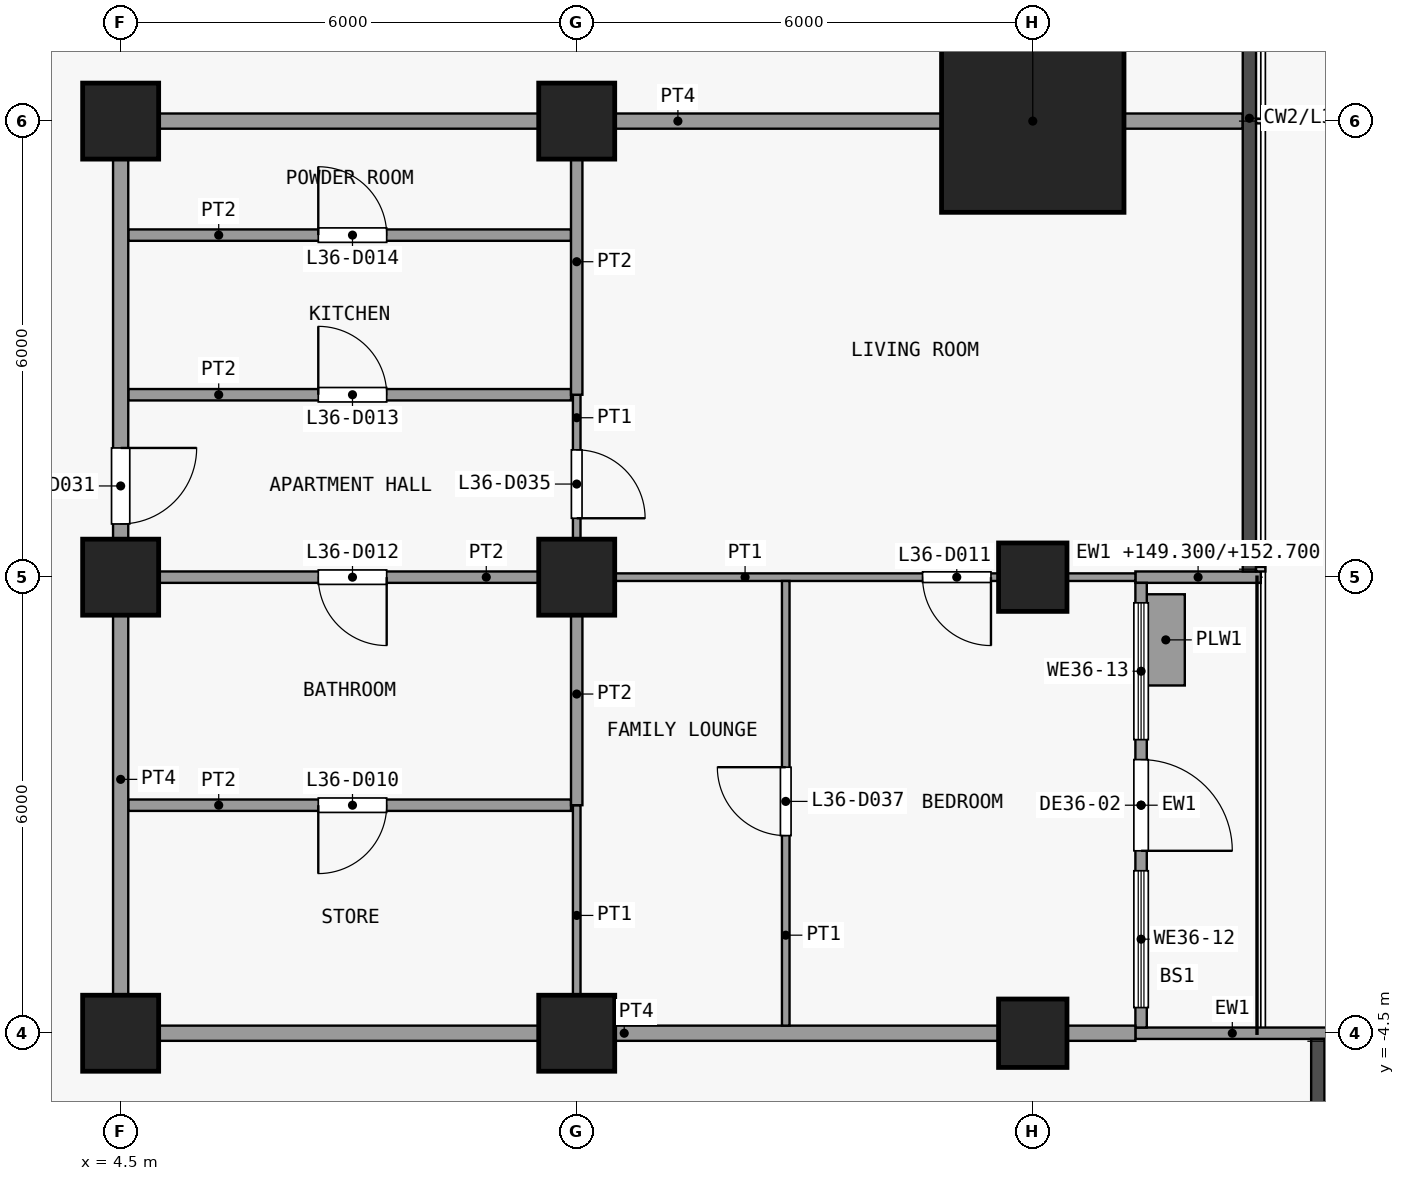
"""IFC4 building model, lengths in metres.
Left out: names, types, materials, properties, quantities, classifications, styles, units other than length and angle.
Written with IfcOpenShell. Run it as: python <this file> out.ifc"""

import sys

from ifc_helpers import new_model, si_unit, direction, frame, frame_2d, origin, origin_2d, place, context, subcontext, project, spatial, rectangle, extrude, element, fill, save


model = new_model("IFC4")
c1 = context("Model", 3, precision=1e-05, world=origin(), true_north=direction((0.0, 1.0)))
c2 = subcontext(c1, "Body", "Model", "MODEL_VIEW")
j1 = project(units=[si_unit("LENGTHUNIT", "METRE"), si_unit("PLANEANGLEUNIT", "RADIAN")], contexts=[c1])
p1 = place(None, origin())
s1 = spatial("IfcSite", under=j1, at=p1, CompositionType="ELEMENT")
p2 = place(p1, origin())
s2 = spatial("IfcBuilding", under=s1, at=p2, CompositionType="ELEMENT")
p3 = place(p2, frame((0.0, 0.0, 149.3)))
s3 = spatial("IfcBuildingStorey", under=s2, at=p3, CompositionType="ELEMENT", Elevation=149.3)
for number, where, z_axis, x_axis in (
    (1, (4.5, -4.5, 0.0), (0.0, 0.0, 1.0), (1.0, 0.0, 0.0)),
    (2, (4.5, 1.5, 0.0), (0.0, 0.0, 1.0), (1.0, 0.0, 0.0)),
    (3, (4.5, 7.5, 0.0), (0.0, 0.0, 1.0), (1.0, 0.0, 0.0)),
    (4, (10.5, -4.5, 0.0), (0.0, 0.0, 1.0), (1.0, 0.0, 0.0)),
    (5, (10.5, 1.5, 0.0), (0.0, 0.0, 1.0), (1.0, 0.0, 0.0)),
    (6, (10.5, 7.5, 0.0), (0.0, 0.0, 1.0), (1.0, 0.0, 0.0)),
):
    element("IfcColumn", number, at=place(p3, frame(where, z_axis=z_axis, x_axis=x_axis)), inside=s3, PredefinedType="COLUMN", context=c2, shape_type="SweptSolid", body=[
        extrude(rectangle(XDim=1.0, YDim=1.0, at=origin_2d()), origin(), (0.0, 0.0, 1.0), 3.6),
    ])
for number, where, z_axis, x_axis in (
    (7, (16.5, -4.5, 0.0), (0.0, 0.0, 1.0), (1.0, 0.0, 0.0)),
    (8, (16.5, 1.5, 0.0), (0.0, 0.0, 1.0), (1.0, 0.0, 0.0)),
):
    element("IfcColumn", number, at=place(p3, frame(where, z_axis=z_axis, x_axis=x_axis)), inside=s3, PredefinedType="COLUMN", context=c2, shape_type="SweptSolid", body=[
        extrude(rectangle(XDim=0.9, YDim=0.9, at=origin_2d()), origin(), (0.0, 0.0, 1.0), 3.6),
    ])
p4 = place(p3, frame((16.5, 7.5, 0.0), z_axis=(0.0, 0.0, 1.0), x_axis=(1.0, 0.0, 0.0)))
e9 = element("IfcColumn", 9, at=p4, inside=s3, PredefinedType="COLUMN", context=c2, shape_type="SweptSolid", body=[
    extrude(rectangle(XDim=2.4, YDim=2.4, at=origin_2d()), origin(), (0.0, 0.0, 1.0), 3.6),
])
p5 = place(p3, frame((17.85, -4.5, 0.0), z_axis=(0.0, 0.0, 1.0), x_axis=(1.0, 0.0, 0.0)))
e10 = element("IfcWall", 10, at=p5, inside=s3, PredefinedType="SOLIDWALL", context=c2, shape_type="SweptSolid", body=[
    extrude(rectangle(XDim=2.55, YDim=0.15, at=frame_2d((1.275, 0.0))), origin(), (0.0, 0.0, 1.0), 3.3),
])
p6 = place(p3, frame((17.85, 1.5, 0.0), z_axis=(0.0, 0.0, 1.0), x_axis=(1.0, 0.0, 0.0)))
e11 = element("IfcWall", 11, at=p6, inside=s3, PredefinedType="SOLIDWALL", context=c2, shape_type="SweptSolid", body=[
    extrude(rectangle(XDim=1.65, YDim=0.15, at=frame_2d((0.825, 0.0))), origin(), (0.0, 0.0, 1.0), 3.4),
])
p7 = place(p3, frame((17.925, 1.425, 0.0), z_axis=(0.0, 0.0, 1.0), x_axis=(0.0, -1.0, 0.0)))
e12 = element("IfcWall", 12, at=p7, inside=s3, PredefinedType="SOLIDWALL", context=c2, shape_type="SweptSolid", body=[
    extrude(rectangle(XDim=5.85, YDim=0.15, at=frame_2d((2.925, 0.0))), origin(), (0.0, 0.0, 1.0), 3.3),
])
p8 = place(p7, frame((2.325, 0.0, 0.0)))
e13 = element("IfcOpeningElement", 13, at=p8, cuts=e12, PredefinedType="OPENING", context=c2, shape_type="SweptSolid", body=[
    extrude(rectangle(XDim=1.2, YDim=2.4, at=frame_2d((0.6, 1.2))), frame((0.0, 0.085, 0.0), z_axis=(0.0, -1.0, 0.0), x_axis=(1.0, 0.0, 0.0)), (0.0, 0.0, 1.0), 0.17),
])
p9 = place(p7, frame((3.788, 0.0, 0.9)))
e14 = element("IfcOpeningElement", 14, at=p9, cuts=e12, PredefinedType="OPENING", context=c2, shape_type="SweptSolid", body=[
    extrude(rectangle(XDim=1.8, YDim=2.1, at=frame_2d((0.9, 1.05))), frame((0.0, 0.085, 0.0), z_axis=(0.0, -1.0, 0.0), x_axis=(1.0, 0.0, 0.0)), (0.0, 0.0, 1.0), 0.17),
])
p10 = place(p7, frame((0.262, 0.0, 0.9)))
e15 = element("IfcOpeningElement", 15, at=p10, cuts=e12, PredefinedType="OPENING", context=c2, shape_type="SweptSolid", body=[
    extrude(rectangle(XDim=1.8, YDim=2.1, at=frame_2d((0.9, 1.05))), frame((0.0, 0.085, 0.0), z_axis=(0.0, -1.0, 0.0), x_axis=(1.0, 0.0, 0.0)), (0.0, 0.0, 1.0), 0.17),
])
p11 = place(p3, frame((18.25, 0.075, 0.0), z_axis=(0.0, 0.0, 1.0), x_axis=(0.0, 1.0, 0.0)))
e16 = element("IfcWall", 16, at=p11, inside=s3, PredefinedType="USERDEFINED", context=c2, shape_type="SweptSolid", body=[
    extrude(rectangle(XDim=1.2, YDim=0.5, at=frame_2d((0.6, 0.0))), origin(), (0.0, 0.0, 1.0), 0.9),
])
p12 = place(p3, frame((4.4, -4.5, 0.0), z_axis=(0.0, 0.0, 1.0), x_axis=(1.0, 0.0, 0.0)))
e17 = element("IfcWall", 17, at=p12, inside=s3, PredefinedType="PARTITIONING", context=c2, shape_type="SweptSolid", body=[
    extrude(rectangle(XDim=13.45, YDim=0.2, at=frame_2d((6.725, 0.0))), origin(), (0.0, 0.0, 1.0), 3.3),
])
p13 = place(p3, frame((4.6, -1.5, 0.0), z_axis=(0.0, 0.0, 1.0), x_axis=(1.0, 0.0, 0.0)))
e18 = element("IfcWall", 18, at=p13, inside=s3, PredefinedType="PARTITIONING", context=c2, shape_type="SweptSolid", body=[
    extrude(rectangle(XDim=5.825, YDim=0.15, at=frame_2d((2.913, 0.0))), origin(), (0.0, 0.0, 1.0), 3.3),
])
p14 = place(p13, frame((2.5, 0.0, 0.0)))
e19 = element("IfcOpeningElement", 19, at=p14, cuts=e18, PredefinedType="OPENING", context=c2, shape_type="SweptSolid", body=[
    extrude(rectangle(XDim=0.9, YDim=2.1, at=frame_2d((0.45, 1.05))), frame((0.0, 0.085, 0.0), z_axis=(0.0, -1.0, 0.0), x_axis=(1.0, 0.0, 0.0)), (0.0, 0.0, 1.0), 0.17),
])
p15 = place(p3, frame((10.5, 1.5, 0.0), z_axis=(0.0, 0.0, 1.0), x_axis=(1.0, 0.0, 0.0)))
e20 = element("IfcWall", 20, at=p15, inside=s3, PredefinedType="PARTITIONING", context=c2, shape_type="SweptSolid", body=[
    extrude(rectangle(XDim=7.35, YDim=0.1, at=frame_2d((3.675, 0.0))), origin(), (0.0, 0.0, 1.0), 3.3),
])
p16 = place(p15, frame((4.55, 0.0, 0.0)))
e21 = element("IfcOpeningElement", 21, at=p16, cuts=e20, PredefinedType="OPENING", context=c2, shape_type="SweptSolid", body=[
    extrude(rectangle(XDim=0.9, YDim=2.1, at=frame_2d((0.45, 1.05))), frame((0.0, 0.06, 0.0), z_axis=(0.0, -1.0, 0.0), x_axis=(1.0, 0.0, 0.0)), (0.0, 0.0, 1.0), 0.12),
])
p17 = place(p3, frame((4.6, 1.5, 0.0), z_axis=(0.0, 0.0, 1.0), x_axis=(1.0, 0.0, 0.0)))
e22 = element("IfcWall", 22, at=p17, inside=s3, PredefinedType="PARTITIONING", context=c2, shape_type="SweptSolid", body=[
    extrude(rectangle(XDim=5.9, YDim=0.15, at=frame_2d((2.95, 0.0))), origin(), (0.0, 0.0, 1.0), 3.3),
])
p18 = place(p17, frame((2.5, 0.0, 0.0)))
e23 = element("IfcOpeningElement", 23, at=p18, cuts=e22, PredefinedType="OPENING", context=c2, shape_type="SweptSolid", body=[
    extrude(rectangle(XDim=0.9, YDim=2.1, at=frame_2d((0.45, 1.05))), frame((0.0, 0.085, 0.0), z_axis=(0.0, -1.0, 0.0), x_axis=(1.0, 0.0, 0.0)), (0.0, 0.0, 1.0), 0.17),
])
p19 = place(p3, frame((4.6, 3.9, 0.0), z_axis=(0.0, 0.0, 1.0), x_axis=(1.0, 0.0, 0.0)))
e24 = element("IfcWall", 24, at=p19, inside=s3, PredefinedType="PARTITIONING", context=c2, shape_type="SweptSolid", body=[
    extrude(rectangle(XDim=5.825, YDim=0.15, at=frame_2d((2.913, 0.0))), origin(), (0.0, 0.0, 1.0), 3.3),
])
p20 = place(p19, frame((2.5, 0.0, 0.0)))
e25 = element("IfcOpeningElement", 25, at=p20, cuts=e24, PredefinedType="OPENING", context=c2, shape_type="SweptSolid", body=[
    extrude(rectangle(XDim=0.9, YDim=2.1, at=frame_2d((0.45, 1.05))), frame((0.0, 0.085, 0.0), z_axis=(0.0, -1.0, 0.0), x_axis=(1.0, 0.0, 0.0)), (0.0, 0.0, 1.0), 0.17),
])
p21 = place(p3, frame((4.6, 6.0, 0.0), z_axis=(0.0, 0.0, 1.0), x_axis=(1.0, 0.0, 0.0)))
e26 = element("IfcWall", 26, at=p21, inside=s3, PredefinedType="PARTITIONING", context=c2, shape_type="SweptSolid", body=[
    extrude(rectangle(XDim=5.825, YDim=0.15, at=frame_2d((2.913, 0.0))), origin(), (0.0, 0.0, 1.0), 3.3),
])
p22 = place(p21, frame((2.5, 0.0, 0.0)))
e27 = element("IfcOpeningElement", 27, at=p22, cuts=e26, PredefinedType="OPENING", context=c2, shape_type="SweptSolid", body=[
    extrude(rectangle(XDim=0.9, YDim=2.1, at=frame_2d((0.45, 1.05))), frame((0.0, 0.085, 0.0), z_axis=(0.0, -1.0, 0.0), x_axis=(1.0, 0.0, 0.0)), (0.0, 0.0, 1.0), 0.17),
])
p23 = place(p3, frame((4.4, 7.5, 0.0), z_axis=(0.0, 0.0, 1.0), x_axis=(1.0, 0.0, 0.0)))
e28 = element("IfcWall", 28, at=p23, inside=s3, PredefinedType="PARTITIONING", context=c2, shape_type="SweptSolid", body=[
    extrude(rectangle(XDim=14.863, YDim=0.2, at=frame_2d((7.431, 0.0))), origin(), (0.0, 0.0, 1.0), 3.3),
])
p24 = place(p3, frame((4.5, -4.4, 0.0), z_axis=(0.0, 0.0, 1.0), x_axis=(0.0, 1.0, 0.0)))
e29 = element("IfcWall", 29, at=p24, inside=s3, PredefinedType="PARTITIONING", context=c2, shape_type="SweptSolid", body=[
    extrude(rectangle(XDim=11.8, YDim=0.2, at=frame_2d((5.9, 0.0))), origin(), (0.0, 0.0, 1.0), 3.3),
])
p25 = place(p24, frame((6.6, 0.0, 0.0)))
e30 = element("IfcOpeningElement", 30, at=p25, cuts=e29, PredefinedType="OPENING", context=c2, shape_type="SweptSolid", body=[
    extrude(rectangle(XDim=1.0, YDim=2.1, at=frame_2d((0.5, 1.05))), frame((0.0, 0.11, 0.0), z_axis=(0.0, -1.0, 0.0), x_axis=(1.0, 0.0, 0.0)), (0.0, 0.0, 1.0), 0.22),
])
p26 = place(p3, frame((10.5, -4.4, 0.0), z_axis=(0.0, 0.0, 1.0), x_axis=(0.0, 1.0, 0.0)))
e31 = element("IfcWall", 31, at=p26, inside=s3, PredefinedType="PARTITIONING", context=c2, shape_type="SweptSolid", body=[
    extrude(rectangle(XDim=2.9, YDim=0.1, at=frame_2d((1.45, 0.0))), origin(), (0.0, 0.0, 1.0), 3.3),
])
p27 = place(p3, frame((10.5, 1.575, 0.0), z_axis=(0.0, 0.0, 1.0), x_axis=(0.0, 1.0, 0.0)))
e32 = element("IfcWall", 32, at=p27, inside=s3, PredefinedType="PARTITIONING", context=c2, shape_type="SweptSolid", body=[
    extrude(rectangle(XDim=2.325, YDim=0.1, at=frame_2d((1.163, 0.0))), origin(), (0.0, 0.0, 1.0), 3.3),
])
p28 = place(p27, frame((0.7, 0.0, 0.0)))
e33 = element("IfcOpeningElement", 33, at=p28, cuts=e32, PredefinedType="OPENING", context=c2, shape_type="SweptSolid", body=[
    extrude(rectangle(XDim=0.9, YDim=2.1, at=frame_2d((0.45, 1.05))), frame((0.0, 0.06, 0.0), z_axis=(0.0, -1.0, 0.0), x_axis=(1.0, 0.0, 0.0)), (0.0, 0.0, 1.0), 0.12),
])
p29 = place(p3, frame((10.5, -1.5, 0.0), z_axis=(0.0, 0.0, 1.0), x_axis=(0.0, 1.0, 0.0)))
e34 = element("IfcWall", 34, at=p29, inside=s3, PredefinedType="PARTITIONING", context=c2, shape_type="SweptSolid", body=[
    extrude(rectangle(XDim=2.925, YDim=0.15, at=frame_2d((1.462, 0.0))), origin(), (0.0, 0.0, 1.0), 3.3),
])
p30 = place(p3, frame((10.5, 3.9, 0.0), z_axis=(0.0, 0.0, 1.0), x_axis=(0.0, 1.0, 0.0)))
e35 = element("IfcWall", 35, at=p30, inside=s3, PredefinedType="PARTITIONING", context=c2, shape_type="SweptSolid", body=[
    extrude(rectangle(XDim=3.5, YDim=0.15, at=frame_2d((1.75, 0.0))), origin(), (0.0, 0.0, 1.0), 3.3),
])
p31 = place(p3, frame((13.25, -4.4, 0.0), z_axis=(0.0, 0.0, 1.0), x_axis=(0.0, 1.0, 0.0)))
e36 = element("IfcWall", 36, at=p31, inside=s3, PredefinedType="PARTITIONING", context=c2, shape_type="SweptSolid", body=[
    extrude(rectangle(XDim=5.85, YDim=0.1, at=frame_2d((2.925, 0.0))), origin(), (0.0, 0.0, 1.0), 3.3),
])
p32 = place(p31, frame((2.5, 0.0, 0.0)))
e37 = element("IfcOpeningElement", 37, at=p32, cuts=e36, PredefinedType="OPENING", context=c2, shape_type="SweptSolid", body=[
    extrude(rectangle(XDim=0.9, YDim=2.1, at=frame_2d((0.45, 1.05))), frame((0.0, 0.06, 0.0), z_axis=(0.0, -1.0, 0.0), x_axis=(1.0, 0.0, 0.0)), (0.0, 0.0, 1.0), 0.12),
])
p33 = place(p8, origin())
e38 = element("IfcDoor", 38, at=p33, inside=s3, OperationType="SINGLE_SWING_RIGHT", PredefinedType="DOOR", context=c2, shape_type="SweptSolid", body=[
    extrude(rectangle(XDim=1.2, YDim=2.4, at=frame_2d((0.6, 1.2))), frame((0.0, 0.025, 0.0), z_axis=(0.0, -1.0, 0.0), x_axis=(1.0, 0.0, 0.0)), (0.0, 0.0, 1.0), 0.05),
])
fill(e13, e38)
p34 = place(p9, origin())
e39 = element("IfcWindow", 39, at=p34, inside=s3, PartitioningType="SINGLE_PANEL", PredefinedType="WINDOW", context=c2, shape_type="SweptSolid", body=[
    extrude(rectangle(XDim=1.8, YDim=2.1, at=frame_2d((0.9, 1.05))), frame((0.0, 0.03, 0.0), z_axis=(0.0, -1.0, 0.0), x_axis=(1.0, 0.0, 0.0)), (0.0, 0.0, 1.0), 0.06),
])
fill(e14, e39)
p35 = place(p10, origin())
e40 = element("IfcWindow", 40, at=p35, inside=s3, PartitioningType="SINGLE_PANEL", PredefinedType="WINDOW", context=c2, shape_type="SweptSolid", body=[
    extrude(rectangle(XDim=1.8, YDim=2.1, at=frame_2d((0.9, 1.05))), frame((0.0, 0.03, 0.0), z_axis=(0.0, -1.0, 0.0), x_axis=(1.0, 0.0, 0.0)), (0.0, 0.0, 1.0), 0.06),
])
fill(e15, e40)
p36 = place(p14, origin())
e41 = element("IfcDoor", 41, at=p36, inside=s3, OperationType="SINGLE_SWING_LEFT", PredefinedType="DOOR", context=c2, shape_type="SweptSolid", body=[
    extrude(rectangle(XDim=0.9, YDim=2.1, at=frame_2d((0.45, 1.05))), frame((0.0, 0.025, 0.0), z_axis=(0.0, -1.0, 0.0), x_axis=(1.0, 0.0, 0.0)), (0.0, 0.0, 1.0), 0.05),
])
fill(e19, e41)
p37 = place(p16, origin())
e42 = element("IfcDoor", 42, at=p37, inside=s3, OperationType="SINGLE_SWING_RIGHT", PredefinedType="DOOR", context=c2, shape_type="SweptSolid", body=[
    extrude(rectangle(XDim=0.9, YDim=2.1, at=frame_2d((0.45, 1.05))), frame((0.0, 0.025, 0.0), z_axis=(0.0, -1.0, 0.0), x_axis=(1.0, 0.0, 0.0)), (0.0, 0.0, 1.0), 0.05),
])
fill(e21, e42)
p38 = place(p18, origin())
e43 = element("IfcDoor", 43, at=p38, inside=s3, OperationType="SINGLE_SWING_RIGHT", PredefinedType="DOOR", context=c2, shape_type="SweptSolid", body=[
    extrude(rectangle(XDim=0.9, YDim=2.1, at=frame_2d((0.45, 1.05))), frame((0.0, 0.025, 0.0), z_axis=(0.0, -1.0, 0.0), x_axis=(1.0, 0.0, 0.0)), (0.0, 0.0, 1.0), 0.05),
])
fill(e23, e43)
p39 = place(p20, origin())
e44 = element("IfcDoor", 44, at=p39, inside=s3, OperationType="SINGLE_SWING_RIGHT", PredefinedType="DOOR", context=c2, shape_type="SweptSolid", body=[
    extrude(rectangle(XDim=0.9, YDim=2.1, at=frame_2d((0.45, 1.05))), frame((0.0, 0.025, 0.0), z_axis=(0.0, -1.0, 0.0), x_axis=(1.0, 0.0, 0.0)), (0.0, 0.0, 1.0), 0.05),
])
fill(e25, e44)
p40 = place(p22, origin())
e45 = element("IfcDoor", 45, at=p40, inside=s3, OperationType="SINGLE_SWING_RIGHT", PredefinedType="DOOR", context=c2, shape_type="SweptSolid", body=[
    extrude(rectangle(XDim=0.9, YDim=2.1, at=frame_2d((0.45, 1.05))), frame((0.0, 0.025, 0.0), z_axis=(0.0, -1.0, 0.0), x_axis=(1.0, 0.0, 0.0)), (0.0, 0.0, 1.0), 0.05),
])
fill(e27, e45)
p41 = place(p25, origin())
e46 = element("IfcDoor", 46, at=p41, inside=s3, OperationType="SINGLE_SWING_RIGHT", PredefinedType="DOOR", context=c2, shape_type="SweptSolid", body=[
    extrude(rectangle(XDim=1.0, YDim=2.1, at=frame_2d((0.5, 1.05))), frame((0.0, 0.025, 0.0), z_axis=(0.0, -1.0, 0.0), x_axis=(1.0, 0.0, 0.0)), (0.0, 0.0, 1.0), 0.05),
])
fill(e30, e46)
p42 = place(p28, origin())
e47 = element("IfcDoor", 47, at=p42, inside=s3, OperationType="SINGLE_SWING_LEFT", PredefinedType="DOOR", context=c2, shape_type="SweptSolid", body=[
    extrude(rectangle(XDim=0.9, YDim=2.1, at=frame_2d((0.45, 1.05))), frame((0.0, 0.025, 0.0), z_axis=(0.0, -1.0, 0.0), x_axis=(1.0, 0.0, 0.0)), (0.0, 0.0, 1.0), 0.05),
])
fill(e33, e47)
p43 = place(p32, origin())
e48 = element("IfcDoor", 48, at=p43, inside=s3, OperationType="SINGLE_SWING_LEFT", PredefinedType="DOOR", context=c2, shape_type="SweptSolid", body=[
    extrude(rectangle(XDim=0.9, YDim=2.1, at=frame_2d((0.45, 1.05))), frame((0.0, 0.025, 0.0), z_axis=(0.0, -1.0, 0.0), x_axis=(1.0, 0.0, 0.0)), (0.0, 0.0, 1.0), 0.05),
])
fill(e37, e48)
save(model, sys.argv[1])
